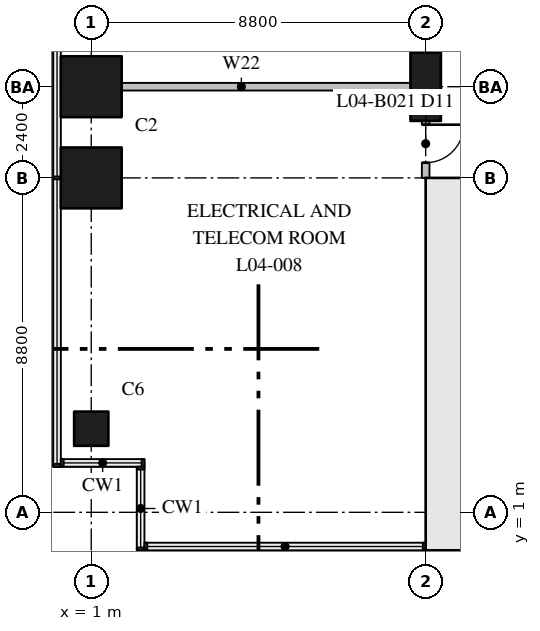
"""IFC4 building model, lengths in metres.
Left out: names, types, materials, properties, quantities, classifications, styles, units other than length and angle.
Written with IfcOpenShell. Run it as: python <this file> out.ifc"""

import sys

from ifc_helpers import new_model, si_unit, direction, frame, frame_2d, origin, origin_2d, place, context, subcontext, project, spatial, rectangle, extrude, element, fill, save


model = new_model("IFC4")
c1 = context("Model", 3, precision=1e-05, world=origin(), true_north=direction((0.0, 1.0)))
c2 = subcontext(c1, "Body", "Model", "MODEL_VIEW")
j1 = project(units=[si_unit("LENGTHUNIT", "METRE"), si_unit("PLANEANGLEUNIT", "RADIAN")], contexts=[c1])
p1 = place(None, origin())
s1 = spatial("IfcSite", under=j1, at=p1, CompositionType="ELEMENT")
p2 = place(p1, origin())
s2 = spatial("IfcBuilding", under=s1, at=p2, CompositionType="ELEMENT")
p3 = place(p2, frame((0.0, 0.0, 23.5)))
s3 = spatial("IfcBuildingStorey", under=s2, at=p3, CompositionType="ELEMENT", Elevation=23.5)
p4 = place(p3, frame((1.0, 3.2, 0.0), z_axis=(0.0, 0.0, 1.0), x_axis=(1.0, 0.0, 0.0)))
e1 = element("IfcColumn", 1, at=p4, inside=s3, PredefinedType="COLUMN", context=c2, shape_type="SweptSolid", body=[
    extrude(rectangle(XDim=0.9, YDim=0.9, at=origin_2d()), origin(), (0.0, 0.0, 1.0), 5.5),
])
for number, where, z_axis, x_axis in (
    (2, (1.0, 9.8, 0.0), (0.0, 0.0, 1.0), (1.0, 0.0, 0.0)),
    (3, (1.0, 12.2, 0.0), (0.0, 0.0, 1.0), (1.0, 0.0, 0.0)),
):
    element("IfcColumn", number, at=place(p3, frame(where, z_axis=z_axis, x_axis=x_axis)), inside=s3, PredefinedType="COLUMN", context=c2, shape_type="SweptSolid", body=[
        extrude(rectangle(XDim=1.6, YDim=1.6, at=origin_2d()), origin(), (0.0, 0.0, 1.0), 5.5),
    ])
p5 = place(p3, frame((9.8, 12.2, 0.0), z_axis=(0.0, 0.0, 1.0), x_axis=(0.0, 1.0, 0.0)))
e4 = element("IfcColumn", 4, at=p5, inside=s3, PredefinedType="COLUMN", context=c2, shape_type="SweptSolid", body=[
    extrude(rectangle(XDim=1.8, YDim=0.8, at=origin_2d()), origin(), (0.0, 0.0, 1.0), 5.5),
])
p6 = place(p3, frame((9.8, 0.6, 0.0), z_axis=(0.0, 0.0, 1.0), x_axis=(1.0, 0.0, 0.0)))
e5 = element("IfcWall", 5, at=p6, inside=s3, PredefinedType="SHEAR", context=c2, shape_type="SweptSolid", body=[
    extrude(rectangle(XDim=35.2, YDim=1.2, at=frame_2d((17.6, 0.0))), origin(), (0.0, 0.0, 1.0), 5.5),
])
p7 = place(p3, frame((10.4, 1.2, 0.0), z_axis=(0.0, 0.0, 1.0), x_axis=(0.0, 1.0, 0.0)))
e6 = element("IfcWall", 6, at=p7, inside=s3, PredefinedType="SHEAR", context=c2, shape_type="SweptSolid", body=[
    extrude(rectangle(XDim=8.6, YDim=1.2, at=frame_2d((4.3, 0.0))), origin(), (0.0, 0.0, 1.0), 5.5),
])
p8 = place(p3, frame((9.8, 9.6, 0.0), z_axis=(0.0, 0.0, 1.0), x_axis=(1.0, 0.0, 0.0)))
e7 = element("IfcWall", 7, at=p8, inside=s3, PredefinedType="SHEAR", context=c2, shape_type="SweptSolid", body=[
    extrude(rectangle(XDim=4.3, YDim=0.4, at=frame_2d((2.15, 0.0))), origin(), (0.0, 0.0, 1.0), 5.5),
])
p9 = place(p8, frame((2.05, 0.0, 0.0)))
e8 = element("IfcOpeningElement", 8, at=p9, cuts=e7, PredefinedType="OPENING", context=c2, shape_type="SweptSolid", body=[
    extrude(rectangle(XDim=1.2, YDim=2.1, at=frame_2d((0.6, 1.05))), frame((0.0, 0.21, 0.0), z_axis=(0.0, -1.0, 0.0), x_axis=(1.0, 0.0, 0.0)), (0.0, 0.0, 1.0), 0.42),
])
p10 = place(p3, frame((0.2, 12.2, 0.0), z_axis=(0.0, 0.0, 1.0), x_axis=(1.0, 0.0, 0.0)))
e9 = element("IfcWall", 9, at=p10, inside=s3, PredefinedType="PARTITIONING", context=c2, shape_type="SweptSolid", body=[
    extrude(rectangle(XDim=9.5, YDim=0.2, at=frame_2d((4.75, 0.0))), origin(), (0.0, 0.0, 1.0), 5.1),
])
p11 = place(p3, frame((9.8, 9.8, 0.0), z_axis=(0.0, 0.0, 1.0), x_axis=(0.0, 1.0, 0.0)))
e10 = element("IfcWall", 10, at=p11, inside=s3, PredefinedType="PARTITIONING", context=c2, shape_type="SweptSolid", body=[
    extrude(rectangle(XDim=48.0, YDim=0.2, at=frame_2d((24.0, 0.0))), origin(), (0.0, 0.0, 1.0), 5.1),
])
p12 = place(p11, frame((6.12, 0.0, 0.0)))
e11 = element("IfcOpeningElement", 11, at=p12, cuts=e10, PredefinedType="OPENING", context=c2, shape_type="SweptSolid", body=[
    extrude(rectangle(XDim=1.0, YDim=2.1, at=frame_2d((0.5, 1.05))), frame((0.0, 0.11, 0.0), z_axis=(0.0, -1.0, 0.0), x_axis=(1.0, 0.0, 0.0)), (0.0, 0.0, 1.0), 0.22),
])
p13 = place(p11, frame((15.63, 0.0, 0.0)))
e12 = element("IfcOpeningElement", 12, at=p13, cuts=e10, PredefinedType="OPENING", context=c2, shape_type="SweptSolid", body=[
    extrude(rectangle(XDim=1.0, YDim=2.1, at=frame_2d((0.5, 1.05))), frame((0.0, 0.11, 0.0), z_axis=(0.0, -1.0, 0.0), x_axis=(1.0, 0.0, 0.0)), (0.0, 0.0, 1.0), 0.22),
])
p14 = place(p11, frame((27.405, 0.0, 0.0)))
e13 = element("IfcOpeningElement", 13, at=p14, cuts=e10, PredefinedType="OPENING", context=c2, shape_type="SweptSolid", body=[
    extrude(rectangle(XDim=1.0, YDim=2.1, at=frame_2d((0.5, 1.05))), frame((0.0, 0.11, 0.0), z_axis=(0.0, -1.0, 0.0), x_axis=(1.0, 0.0, 0.0)), (0.0, 0.0, 1.0), 0.22),
])
p15 = place(p11, frame((33.235, 0.0, 0.0)))
e14 = element("IfcOpeningElement", 14, at=p15, cuts=e10, PredefinedType="OPENING", context=c2, shape_type="SweptSolid", body=[
    extrude(rectangle(XDim=1.0, YDim=2.1, at=frame_2d((0.5, 1.05))), frame((0.0, 0.11, 0.0), z_axis=(0.0, -1.0, 0.0), x_axis=(1.0, 0.0, 0.0)), (0.0, 0.0, 1.0), 0.22),
])
p16 = place(p11, frame((41.04, 0.0, 0.0)))
e15 = element("IfcOpeningElement", 15, at=p16, cuts=e10, PredefinedType="OPENING", context=c2, shape_type="SweptSolid", body=[
    extrude(rectangle(XDim=1.0, YDim=2.1, at=frame_2d((0.5, 1.05))), frame((0.0, 0.11, 0.0), z_axis=(0.0, -1.0, 0.0), x_axis=(1.0, 0.0, 0.0)), (0.0, 0.0, 1.0), 0.22),
])
p17 = place(p11, frame((44.967, 0.0, 0.0)))
e16 = element("IfcOpeningElement", 16, at=p17, cuts=e10, PredefinedType="OPENING", context=c2, shape_type="SweptSolid", body=[
    extrude(rectangle(XDim=1.0, YDim=2.1, at=frame_2d((0.5, 1.05))), frame((0.0, 0.11, 0.0), z_axis=(0.0, -1.0, 0.0), x_axis=(1.0, 0.0, 0.0)), (0.0, 0.0, 1.0), 0.22),
])
p18 = place(p11, frame((0.4, 0.0, 0.0)))
e17 = element("IfcOpeningElement", 17, at=p18, cuts=e10, PredefinedType="OPENING", context=c2, shape_type="SweptSolid", body=[
    extrude(rectangle(XDim=1.0, YDim=2.1, at=frame_2d((0.5, 1.05))), frame((0.0, 0.11, 0.0), z_axis=(0.0, -1.0, 0.0), x_axis=(1.0, 0.0, 0.0)), (0.0, 0.0, 1.0), 0.22),
])
p19 = place(p18, frame((1.0, 0.0, 0.0), z_axis=(0.0, 0.0, 1.0), x_axis=(-1.0, 0.0, 0.0)))
e18 = element("IfcDoor", 18, at=p19, inside=s3, OperationType="SINGLE_SWING_RIGHT", PredefinedType="DOOR", context=c2, shape_type="SweptSolid", body=[
    extrude(rectangle(XDim=1.0, YDim=2.1, at=frame_2d((0.5, 1.05))), frame((0.0, 0.025, 0.0), z_axis=(0.0, -1.0, 0.0), x_axis=(1.0, 0.0, 0.0)), (0.0, 0.0, 1.0), 0.05),
])
fill(e17, e18)
save(model, sys.argv[1])
